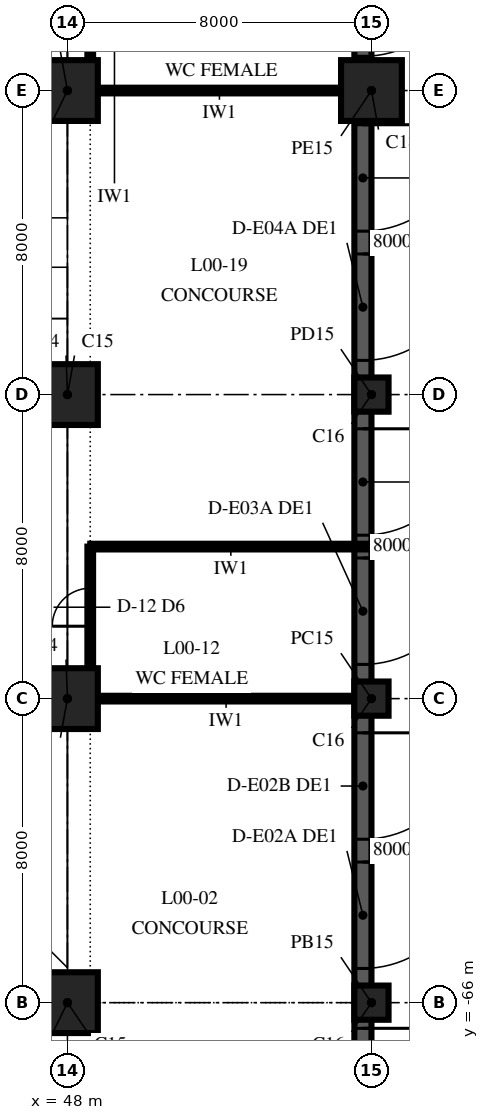
"""IFC4 building model, lengths in metres.
Left out: names, types, materials, properties, quantities, classifications, styles, units other than length and angle.
Written with IfcOpenShell. Run it as: python <this file> out.ifc"""

import sys

from ifc_helpers import new_model, si_unit, direction, frame, frame_2d, origin, origin_2d, place, context, subcontext, project, spatial, rectangle, extrude, element, fill, save


model = new_model("IFC4")
c1 = context("Model", 3, precision=1e-05, world=origin(), true_north=direction((0.0, 1.0)))
c2 = subcontext(c1, "Body", "Model", "MODEL_VIEW")
j1 = project(units=[si_unit("LENGTHUNIT", "METRE"), si_unit("PLANEANGLEUNIT", "RADIAN")], contexts=[c1])
p1 = place(None, origin())
s1 = spatial("IfcSite", under=j1, at=p1, CompositionType="ELEMENT")
p2 = place(p1, origin())
s2 = spatial("IfcBuilding", under=s1, at=p2, CompositionType="ELEMENT")
p3 = place(p2, origin())
s3 = spatial("IfcBuildingStorey", under=s2, at=p3, CompositionType="ELEMENT", Elevation=0.0)
for number, where, z_axis, x_axis in (
    (1, (48.0, -66.0, 0.0), (0.0, 0.0, 1.0), (1.0, 0.0, 0.0)),
    (2, (48.0, -58.0, 0.0), (0.0, 0.0, 1.0), (1.0, 0.0, 0.0)),
    (3, (48.0, -50.0, 0.0), (0.0, 0.0, 1.0), (1.0, 0.0, 0.0)),
    (4, (48.0, -42.0, 0.0), (0.0, 0.0, 1.0), (1.0, 0.0, 0.0)),
):
    element("IfcColumn", number, at=place(p3, frame(where, z_axis=z_axis, x_axis=x_axis)), inside=s3, PredefinedType="COLUMN", context=c2, shape_type="SweptSolid", body=[
        extrude(rectangle(XDim=1.6, YDim=1.6, at=origin_2d()), origin(), (0.0, 0.0, 1.0), 6.0),
    ])
for number, where, z_axis, x_axis in (
    (5, (56.0, -66.0, 0.0), (0.0, 0.0, 1.0), (1.0, 0.0, 0.0)),
    (6, (56.0, -58.0, 0.0), (0.0, 0.0, 1.0), (1.0, 0.0, 0.0)),
    (7, (56.0, -50.0, 0.0), (0.0, 0.0, 1.0), (1.0, 0.0, 0.0)),
):
    element("IfcColumn", number, at=place(p3, frame(where, z_axis=z_axis, x_axis=x_axis)), inside=s3, PredefinedType="COLUMN", context=c2, shape_type="SweptSolid", body=[
        extrude(rectangle(XDim=0.9, YDim=0.9, at=origin_2d()), origin(), (0.0, 0.0, 1.0), 6.0),
    ])
p4 = place(p3, frame((56.0, -42.0, 0.0), z_axis=(0.0, 0.0, 1.0), x_axis=(1.0, 0.0, 0.0)))
e8 = element("IfcColumn", 8, at=p4, inside=s3, PredefinedType="COLUMN", context=c2, shape_type="SweptSolid", body=[
    extrude(rectangle(XDim=1.6, YDim=1.6, at=origin_2d()), origin(), (0.0, 0.0, 1.0), 6.0),
])
p5 = place(p3, frame((55.775, -73.55, 0.0), z_axis=(0.0, 0.0, 1.0), x_axis=(0.0, 1.0, 0.0)))
e9 = element("IfcWall", 9, at=p5, inside=s3, PredefinedType="SOLIDWALL", context=c2, shape_type="SweptSolid", body=[
    extrude(rectangle(XDim=119.1, YDim=0.45, at=frame_2d((59.55, 0.0))), origin(), (0.0, 0.0, 1.0), 6.0),
])
p6 = place(p5, frame((0.675, 0.0, 0.0)))
e10 = element("IfcOpeningElement", 10, at=p6, cuts=e9, PredefinedType="OPENING", context=c2, shape_type="SweptSolid", body=[
    extrude(rectangle(XDim=2.8, YDim=2.4, at=frame_2d((1.4, 1.2))), frame((0.0, 0.24, 0.0), z_axis=(0.0, -1.0, 0.0), x_axis=(1.0, 0.0, 0.0)), (0.0, 0.0, 1.0), 0.48),
])
p7 = place(p5, frame((4.075, 0.0, 0.0)))
e11 = element("IfcOpeningElement", 11, at=p7, cuts=e9, PredefinedType="OPENING", context=c2, shape_type="SweptSolid", body=[
    extrude(rectangle(XDim=2.8, YDim=2.4, at=frame_2d((1.4, 1.2))), frame((0.0, 0.24, 0.0), z_axis=(0.0, -1.0, 0.0), x_axis=(1.0, 0.0, 0.0)), (0.0, 0.0, 1.0), 0.48),
])
p8 = place(p5, frame((8.45, 0.0, 0.0)))
e12 = element("IfcOpeningElement", 12, at=p8, cuts=e9, PredefinedType="OPENING", context=c2, shape_type="SweptSolid", body=[
    extrude(rectangle(XDim=2.8, YDim=2.4, at=frame_2d((1.4, 1.2))), frame((0.0, 0.24, 0.0), z_axis=(0.0, -1.0, 0.0), x_axis=(1.0, 0.0, 0.0)), (0.0, 0.0, 1.0), 0.48),
])
p9 = place(p5, frame((11.85, 0.0, 0.0)))
e13 = element("IfcOpeningElement", 13, at=p9, cuts=e9, PredefinedType="OPENING", context=c2, shape_type="SweptSolid", body=[
    extrude(rectangle(XDim=2.8, YDim=2.4, at=frame_2d((1.4, 1.2))), frame((0.0, 0.24, 0.0), z_axis=(0.0, -1.0, 0.0), x_axis=(1.0, 0.0, 0.0)), (0.0, 0.0, 1.0), 0.48),
])
p10 = place(p5, frame((16.45, 0.0, 0.0)))
e14 = element("IfcOpeningElement", 14, at=p10, cuts=e9, PredefinedType="OPENING", context=c2, shape_type="SweptSolid", body=[
    extrude(rectangle(XDim=2.8, YDim=2.4, at=frame_2d((1.4, 1.2))), frame((0.0, 0.24, 0.0), z_axis=(0.0, -1.0, 0.0), x_axis=(1.0, 0.0, 0.0)), (0.0, 0.0, 1.0), 0.48),
])
p11 = place(p5, frame((19.85, 0.0, 0.0)))
e15 = element("IfcOpeningElement", 15, at=p11, cuts=e9, PredefinedType="OPENING", context=c2, shape_type="SweptSolid", body=[
    extrude(rectangle(XDim=2.8, YDim=2.4, at=frame_2d((1.4, 1.2))), frame((0.0, 0.24, 0.0), z_axis=(0.0, -1.0, 0.0), x_axis=(1.0, 0.0, 0.0)), (0.0, 0.0, 1.0), 0.48),
])
p12 = place(p5, frame((24.45, 0.0, 0.0)))
e16 = element("IfcOpeningElement", 16, at=p12, cuts=e9, PredefinedType="OPENING", context=c2, shape_type="SweptSolid", body=[
    extrude(rectangle(XDim=2.8, YDim=2.4, at=frame_2d((1.4, 1.2))), frame((0.0, 0.24, 0.0), z_axis=(0.0, -1.0, 0.0), x_axis=(1.0, 0.0, 0.0)), (0.0, 0.0, 1.0), 0.48),
])
p13 = place(p5, frame((27.85, 0.0, 0.0)))
e17 = element("IfcOpeningElement", 17, at=p13, cuts=e9, PredefinedType="OPENING", context=c2, shape_type="SweptSolid", body=[
    extrude(rectangle(XDim=2.8, YDim=2.4, at=frame_2d((1.4, 1.2))), frame((0.0, 0.24, 0.0), z_axis=(0.0, -1.0, 0.0), x_axis=(1.0, 0.0, 0.0)), (0.0, 0.0, 1.0), 0.48),
])
p14 = place(p5, frame((32.45, 0.0, 0.0)))
e18 = element("IfcOpeningElement", 18, at=p14, cuts=e9, PredefinedType="OPENING", context=c2, shape_type="SweptSolid", body=[
    extrude(rectangle(XDim=2.8, YDim=2.4, at=frame_2d((1.4, 1.2))), frame((0.0, 0.24, 0.0), z_axis=(0.0, -1.0, 0.0), x_axis=(1.0, 0.0, 0.0)), (0.0, 0.0, 1.0), 0.48),
])
p15 = place(p5, frame((35.85, 0.0, 0.0)))
e19 = element("IfcOpeningElement", 19, at=p15, cuts=e9, PredefinedType="OPENING", context=c2, shape_type="SweptSolid", body=[
    extrude(rectangle(XDim=2.8, YDim=2.4, at=frame_2d((1.4, 1.2))), frame((0.0, 0.24, 0.0), z_axis=(0.0, -1.0, 0.0), x_axis=(1.0, 0.0, 0.0)), (0.0, 0.0, 1.0), 0.48),
])
p16 = place(p5, frame((43.425, 0.0, 0.0)))
e20 = element("IfcOpeningElement", 20, at=p16, cuts=e9, PredefinedType="OPENING", context=c2, shape_type="SweptSolid", body=[
    extrude(rectangle(XDim=2.8, YDim=2.4, at=frame_2d((1.4, 1.2))), frame((0.0, 0.24, 0.0), z_axis=(0.0, -1.0, 0.0), x_axis=(1.0, 0.0, 0.0)), (0.0, 0.0, 1.0), 0.48),
])
p17 = place(p5, frame((48.45, 0.0, 0.0)))
e21 = element("IfcOpeningElement", 21, at=p17, cuts=e9, PredefinedType="OPENING", context=c2, shape_type="SweptSolid", body=[
    extrude(rectangle(XDim=2.8, YDim=2.4, at=frame_2d((1.4, 1.2))), frame((0.0, 0.24, 0.0), z_axis=(0.0, -1.0, 0.0), x_axis=(1.0, 0.0, 0.0)), (0.0, 0.0, 1.0), 0.48),
])
p18 = place(p5, frame((51.85, 0.0, 0.0)))
e22 = element("IfcOpeningElement", 22, at=p18, cuts=e9, PredefinedType="OPENING", context=c2, shape_type="SweptSolid", body=[
    extrude(rectangle(XDim=2.8, YDim=2.4, at=frame_2d((1.4, 1.2))), frame((0.0, 0.24, 0.0), z_axis=(0.0, -1.0, 0.0), x_axis=(1.0, 0.0, 0.0)), (0.0, 0.0, 1.0), 0.48),
])
p19 = place(p5, frame((56.45, 0.0, 0.0)))
e23 = element("IfcOpeningElement", 23, at=p19, cuts=e9, PredefinedType="OPENING", context=c2, shape_type="SweptSolid", body=[
    extrude(rectangle(XDim=2.8, YDim=2.4, at=frame_2d((1.4, 1.2))), frame((0.0, 0.24, 0.0), z_axis=(0.0, -1.0, 0.0), x_axis=(1.0, 0.0, 0.0)), (0.0, 0.0, 1.0), 0.48),
])
p20 = place(p5, frame((59.85, 0.0, 0.0)))
e24 = element("IfcOpeningElement", 24, at=p20, cuts=e9, PredefinedType="OPENING", context=c2, shape_type="SweptSolid", body=[
    extrude(rectangle(XDim=2.8, YDim=2.4, at=frame_2d((1.4, 1.2))), frame((0.0, 0.24, 0.0), z_axis=(0.0, -1.0, 0.0), x_axis=(1.0, 0.0, 0.0)), (0.0, 0.0, 1.0), 0.48),
])
p21 = place(p5, frame((64.45, 0.0, 0.0)))
e25 = element("IfcOpeningElement", 25, at=p21, cuts=e9, PredefinedType="OPENING", context=c2, shape_type="SweptSolid", body=[
    extrude(rectangle(XDim=2.8, YDim=2.4, at=frame_2d((1.4, 1.2))), frame((0.0, 0.24, 0.0), z_axis=(0.0, -1.0, 0.0), x_axis=(1.0, 0.0, 0.0)), (0.0, 0.0, 1.0), 0.48),
])
p22 = place(p5, frame((67.85, 0.0, 0.0)))
e26 = element("IfcOpeningElement", 26, at=p22, cuts=e9, PredefinedType="OPENING", context=c2, shape_type="SweptSolid", body=[
    extrude(rectangle(XDim=2.8, YDim=2.4, at=frame_2d((1.4, 1.2))), frame((0.0, 0.24, 0.0), z_axis=(0.0, -1.0, 0.0), x_axis=(1.0, 0.0, 0.0)), (0.0, 0.0, 1.0), 0.48),
])
p23 = place(p5, frame((72.45, 0.0, 0.0)))
e27 = element("IfcOpeningElement", 27, at=p23, cuts=e9, PredefinedType="OPENING", context=c2, shape_type="SweptSolid", body=[
    extrude(rectangle(XDim=2.8, YDim=2.4, at=frame_2d((1.4, 1.2))), frame((0.0, 0.24, 0.0), z_axis=(0.0, -1.0, 0.0), x_axis=(1.0, 0.0, 0.0)), (0.0, 0.0, 1.0), 0.48),
])
p24 = place(p5, frame((75.85, 0.0, 0.0)))
e28 = element("IfcOpeningElement", 28, at=p24, cuts=e9, PredefinedType="OPENING", context=c2, shape_type="SweptSolid", body=[
    extrude(rectangle(XDim=2.8, YDim=2.4, at=frame_2d((1.4, 1.2))), frame((0.0, 0.24, 0.0), z_axis=(0.0, -1.0, 0.0), x_axis=(1.0, 0.0, 0.0)), (0.0, 0.0, 1.0), 0.48),
])
p25 = place(p5, frame((80.45, 0.0, 0.0)))
e29 = element("IfcOpeningElement", 29, at=p25, cuts=e9, PredefinedType="OPENING", context=c2, shape_type="SweptSolid", body=[
    extrude(rectangle(XDim=2.8, YDim=2.4, at=frame_2d((1.4, 1.2))), frame((0.0, 0.24, 0.0), z_axis=(0.0, -1.0, 0.0), x_axis=(1.0, 0.0, 0.0)), (0.0, 0.0, 1.0), 0.48),
])
p26 = place(p5, frame((83.85, 0.0, 0.0)))
e30 = element("IfcOpeningElement", 30, at=p26, cuts=e9, PredefinedType="OPENING", context=c2, shape_type="SweptSolid", body=[
    extrude(rectangle(XDim=2.8, YDim=2.4, at=frame_2d((1.4, 1.2))), frame((0.0, 0.24, 0.0), z_axis=(0.0, -1.0, 0.0), x_axis=(1.0, 0.0, 0.0)), (0.0, 0.0, 1.0), 0.48),
])
p27 = place(p5, frame((88.45, 0.0, 0.0)))
e31 = element("IfcOpeningElement", 31, at=p27, cuts=e9, PredefinedType="OPENING", context=c2, shape_type="SweptSolid", body=[
    extrude(rectangle(XDim=2.8, YDim=2.4, at=frame_2d((1.4, 1.2))), frame((0.0, 0.24, 0.0), z_axis=(0.0, -1.0, 0.0), x_axis=(1.0, 0.0, 0.0)), (0.0, 0.0, 1.0), 0.48),
])
p28 = place(p5, frame((91.85, 0.0, 0.0)))
e32 = element("IfcOpeningElement", 32, at=p28, cuts=e9, PredefinedType="OPENING", context=c2, shape_type="SweptSolid", body=[
    extrude(rectangle(XDim=2.8, YDim=2.4, at=frame_2d((1.4, 1.2))), frame((0.0, 0.24, 0.0), z_axis=(0.0, -1.0, 0.0), x_axis=(1.0, 0.0, 0.0)), (0.0, 0.0, 1.0), 0.48),
])
p29 = place(p5, frame((96.45, 0.0, 0.0)))
e33 = element("IfcOpeningElement", 33, at=p29, cuts=e9, PredefinedType="OPENING", context=c2, shape_type="SweptSolid", body=[
    extrude(rectangle(XDim=2.8, YDim=2.4, at=frame_2d((1.4, 1.2))), frame((0.0, 0.24, 0.0), z_axis=(0.0, -1.0, 0.0), x_axis=(1.0, 0.0, 0.0)), (0.0, 0.0, 1.0), 0.48),
])
p30 = place(p5, frame((99.85, 0.0, 0.0)))
e34 = element("IfcOpeningElement", 34, at=p30, cuts=e9, PredefinedType="OPENING", context=c2, shape_type="SweptSolid", body=[
    extrude(rectangle(XDim=2.8, YDim=2.4, at=frame_2d((1.4, 1.2))), frame((0.0, 0.24, 0.0), z_axis=(0.0, -1.0, 0.0), x_axis=(1.0, 0.0, 0.0)), (0.0, 0.0, 1.0), 0.48),
])
p31 = place(p5, frame((104.45, 0.0, 0.0)))
e35 = element("IfcOpeningElement", 35, at=p31, cuts=e9, PredefinedType="OPENING", context=c2, shape_type="SweptSolid", body=[
    extrude(rectangle(XDim=2.8, YDim=2.4, at=frame_2d((1.4, 1.2))), frame((0.0, 0.24, 0.0), z_axis=(0.0, -1.0, 0.0), x_axis=(1.0, 0.0, 0.0)), (0.0, 0.0, 1.0), 0.48),
])
p32 = place(p5, frame((107.85, 0.0, 0.0)))
e36 = element("IfcOpeningElement", 36, at=p32, cuts=e9, PredefinedType="OPENING", context=c2, shape_type="SweptSolid", body=[
    extrude(rectangle(XDim=2.8, YDim=2.4, at=frame_2d((1.4, 1.2))), frame((0.0, 0.24, 0.0), z_axis=(0.0, -1.0, 0.0), x_axis=(1.0, 0.0, 0.0)), (0.0, 0.0, 1.0), 0.48),
])
p33 = place(p5, frame((112.225, 0.0, 0.0)))
e37 = element("IfcOpeningElement", 37, at=p33, cuts=e9, PredefinedType="OPENING", context=c2, shape_type="SweptSolid", body=[
    extrude(rectangle(XDim=2.8, YDim=2.4, at=frame_2d((1.4, 1.2))), frame((0.0, 0.24, 0.0), z_axis=(0.0, -1.0, 0.0), x_axis=(1.0, 0.0, 0.0)), (0.0, 0.0, 1.0), 0.48),
])
p34 = place(p5, frame((115.625, 0.0, 0.0)))
e38 = element("IfcOpeningElement", 38, at=p34, cuts=e9, PredefinedType="OPENING", context=c2, shape_type="SweptSolid", body=[
    extrude(rectangle(XDim=2.8, YDim=2.4, at=frame_2d((1.4, 1.2))), frame((0.0, 0.24, 0.0), z_axis=(0.0, -1.0, 0.0), x_axis=(1.0, 0.0, 0.0)), (0.0, 0.0, 1.0), 0.48),
])
p35 = place(p3, frame((48.6, -57.19, 0.0), z_axis=(0.0, 0.0, 1.0), x_axis=(0.0, 1.0, 0.0)))
e39 = element("IfcWall", 39, at=p35, inside=s3, PredefinedType="PARTITIONING", context=c2, shape_type="SweptSolid", body=[
    extrude(rectangle(XDim=3.19, YDim=0.15, at=frame_2d((1.595, 0.0))), origin(), (0.0, 0.0, 1.0), 5.05),
])
p36 = place(p35, frame((1.095, 0.0, 0.0)))
e40 = element("IfcOpeningElement", 40, at=p36, cuts=e39, PredefinedType="OPENING", context=c2, shape_type="SweptSolid", body=[
    extrude(rectangle(XDim=1.0, YDim=2.1, at=frame_2d((0.5, 1.05))), frame((0.0, 0.09, 0.0), z_axis=(0.0, -1.0, 0.0), x_axis=(1.0, 0.0, 0.0)), (0.0, 0.0, 1.0), 0.18),
])
p37 = place(p3, frame((48.6, -41.19, 0.0), z_axis=(0.0, 0.0, 1.0), x_axis=(0.0, 1.0, 0.0)))
e41 = element("IfcWall", 41, at=p37, inside=s3, PredefinedType="PARTITIONING", context=c2, shape_type="SweptSolid", body=[
    extrude(rectangle(XDim=6.38, YDim=0.15, at=frame_2d((3.19, 0.0))), origin(), (0.0, 0.0, 1.0), 4.1),
])
p38 = place(p37, frame((1.095, 0.0, 0.0)))
e42 = element("IfcOpeningElement", 42, at=p38, cuts=e41, PredefinedType="OPENING", context=c2, shape_type="SweptSolid", body=[
    extrude(rectangle(XDim=1.0, YDim=2.1, at=frame_2d((0.5, 1.05))), frame((0.0, 0.09, 0.0), z_axis=(0.0, -1.0, 0.0), x_axis=(1.0, 0.0, 0.0)), (0.0, 0.0, 1.0), 0.18),
])
p39 = place(p37, frame((4.285, 0.0, 0.0)))
e43 = element("IfcOpeningElement", 43, at=p39, cuts=e41, PredefinedType="OPENING", context=c2, shape_type="SweptSolid", body=[
    extrude(rectangle(XDim=1.0, YDim=2.1, at=frame_2d((0.5, 1.05))), frame((0.0, 0.09, 0.0), z_axis=(0.0, -1.0, 0.0), x_axis=(1.0, 0.0, 0.0)), (0.0, 0.0, 1.0), 0.18),
])
p40 = place(p3, frame((48.81, -58.0, 0.0), z_axis=(0.0, 0.0, 1.0), x_axis=(1.0, 0.0, 0.0)))
e44 = element("IfcWall", 44, at=p40, inside=s3, PredefinedType="PARTITIONING", context=c2, shape_type="SweptSolid", body=[
    extrude(rectangle(XDim=6.73, YDim=0.15, at=frame_2d((3.365, 0.0))), origin(), (0.0, 0.0, 1.0), 5.05),
])
p41 = place(p3, frame((48.6, -54.0, 0.0), z_axis=(0.0, 0.0, 1.0), x_axis=(1.0, 0.0, 0.0)))
e45 = element("IfcWall", 45, at=p41, inside=s3, PredefinedType="PARTITIONING", context=c2, shape_type="SweptSolid", body=[
    extrude(rectangle(XDim=7.4, YDim=0.15, at=frame_2d((3.7, 0.0))), origin(), (0.0, 0.0, 1.0), 5.7),
])
p42 = place(p3, frame((48.81, -42.0, 0.0), z_axis=(0.0, 0.0, 1.0), x_axis=(1.0, 0.0, 0.0)))
e46 = element("IfcWall", 46, at=p42, inside=s3, PredefinedType="PARTITIONING", context=c2, shape_type="SweptSolid", body=[
    extrude(rectangle(XDim=6.38, YDim=0.15, at=frame_2d((3.19, 0.0))), origin(), (0.0, 0.0, 1.0), 4.1),
])
p43 = place(p7, frame((2.8, 0.0, 0.0), z_axis=(0.0, 0.0, 1.0), x_axis=(-1.0, 0.0, 0.0)))
e47 = element("IfcDoor", 47, at=p43, inside=s3, OperationType="DOUBLE_DOOR_SINGLE_SWING", PredefinedType="DOOR", context=c2, shape_type="SweptSolid", body=[
    extrude(rectangle(XDim=2.8, YDim=2.4, at=frame_2d((1.4, 1.2))), frame((0.0, 0.225, 0.0), z_axis=(0.0, -1.0, 0.0), x_axis=(1.0, 0.0, 0.0)), (0.0, 0.0, 1.0), 0.449),
])
fill(e11, e47)
p44 = place(p8, frame((2.8, 0.0, 0.0), z_axis=(0.0, 0.0, 1.0), x_axis=(-1.0, 0.0, 0.0)))
e48 = element("IfcDoor", 48, at=p44, inside=s3, OperationType="DOUBLE_DOOR_SINGLE_SWING", PredefinedType="DOOR", context=c2, shape_type="SweptSolid", body=[
    extrude(rectangle(XDim=2.8, YDim=2.4, at=frame_2d((1.4, 1.2))), frame((0.0, 0.225, 0.0), z_axis=(0.0, -1.0, 0.0), x_axis=(1.0, 0.0, 0.0)), (0.0, 0.0, 1.0), 0.449),
])
fill(e12, e48)
p45 = place(p9, frame((2.8, 0.0, 0.0), z_axis=(0.0, 0.0, 1.0), x_axis=(-1.0, 0.0, 0.0)))
e49 = element("IfcDoor", 49, at=p45, inside=s3, OperationType="DOUBLE_DOOR_SINGLE_SWING", PredefinedType="DOOR", context=c2, shape_type="SweptSolid", body=[
    extrude(rectangle(XDim=2.8, YDim=2.4, at=frame_2d((1.4, 1.2))), frame((0.0, 0.225, 0.0), z_axis=(0.0, -1.0, 0.0), x_axis=(1.0, 0.0, 0.0)), (0.0, 0.0, 1.0), 0.449),
])
fill(e13, e49)
p46 = place(p10, frame((2.8, 0.0, 0.0), z_axis=(0.0, 0.0, 1.0), x_axis=(-1.0, 0.0, 0.0)))
e50 = element("IfcDoor", 50, at=p46, inside=s3, OperationType="DOUBLE_DOOR_SINGLE_SWING", PredefinedType="DOOR", context=c2, shape_type="SweptSolid", body=[
    extrude(rectangle(XDim=2.8, YDim=2.4, at=frame_2d((1.4, 1.2))), frame((0.0, 0.225, 0.0), z_axis=(0.0, -1.0, 0.0), x_axis=(1.0, 0.0, 0.0)), (0.0, 0.0, 1.0), 0.449),
])
fill(e14, e50)
p47 = place(p11, frame((2.8, 0.0, 0.0), z_axis=(0.0, 0.0, 1.0), x_axis=(-1.0, 0.0, 0.0)))
e51 = element("IfcDoor", 51, at=p47, inside=s3, OperationType="DOUBLE_DOOR_SINGLE_SWING", PredefinedType="DOOR", context=c2, shape_type="SweptSolid", body=[
    extrude(rectangle(XDim=2.8, YDim=2.4, at=frame_2d((1.4, 1.2))), frame((0.0, 0.225, 0.0), z_axis=(0.0, -1.0, 0.0), x_axis=(1.0, 0.0, 0.0)), (0.0, 0.0, 1.0), 0.449),
])
fill(e15, e51)
p48 = place(p12, frame((2.8, 0.0, 0.0), z_axis=(0.0, 0.0, 1.0), x_axis=(-1.0, 0.0, 0.0)))
e52 = element("IfcDoor", 52, at=p48, inside=s3, OperationType="DOUBLE_DOOR_SINGLE_SWING", PredefinedType="DOOR", context=c2, shape_type="SweptSolid", body=[
    extrude(rectangle(XDim=2.8, YDim=2.4, at=frame_2d((1.4, 1.2))), frame((0.0, 0.225, 0.0), z_axis=(0.0, -1.0, 0.0), x_axis=(1.0, 0.0, 0.0)), (0.0, 0.0, 1.0), 0.449),
])
fill(e16, e52)
p49 = place(p13, frame((2.8, 0.0, 0.0), z_axis=(0.0, 0.0, 1.0), x_axis=(-1.0, 0.0, 0.0)))
e53 = element("IfcDoor", 53, at=p49, inside=s3, OperationType="DOUBLE_DOOR_SINGLE_SWING", PredefinedType="DOOR", context=c2, shape_type="SweptSolid", body=[
    extrude(rectangle(XDim=2.8, YDim=2.4, at=frame_2d((1.4, 1.2))), frame((0.0, 0.225, 0.0), z_axis=(0.0, -1.0, 0.0), x_axis=(1.0, 0.0, 0.0)), (0.0, 0.0, 1.0), 0.449),
])
fill(e17, e53)
p50 = place(p14, frame((2.8, 0.0, 0.0), z_axis=(0.0, 0.0, 1.0), x_axis=(-1.0, 0.0, 0.0)))
e54 = element("IfcDoor", 54, at=p50, inside=s3, OperationType="DOUBLE_DOOR_SINGLE_SWING", PredefinedType="DOOR", context=c2, shape_type="SweptSolid", body=[
    extrude(rectangle(XDim=2.8, YDim=2.4, at=frame_2d((1.4, 1.2))), frame((0.0, 0.225, 0.0), z_axis=(0.0, -1.0, 0.0), x_axis=(1.0, 0.0, 0.0)), (0.0, 0.0, 1.0), 0.449),
])
fill(e18, e54)
p51 = place(p36, origin())
e55 = element("IfcDoor", 55, at=p51, inside=s3, OperationType="SINGLE_SWING_LEFT", PredefinedType="DOOR", context=c2, shape_type="SweptSolid", body=[
    extrude(rectangle(XDim=1.0, YDim=2.1, at=frame_2d((0.5, 1.05))), frame((0.0, 0.075, 0.0), z_axis=(0.0, -1.0, 0.0), x_axis=(1.0, 0.0, 0.0)), (0.0, 0.0, 1.0), 0.149),
])
fill(e40, e55)
save(model, sys.argv[1])
